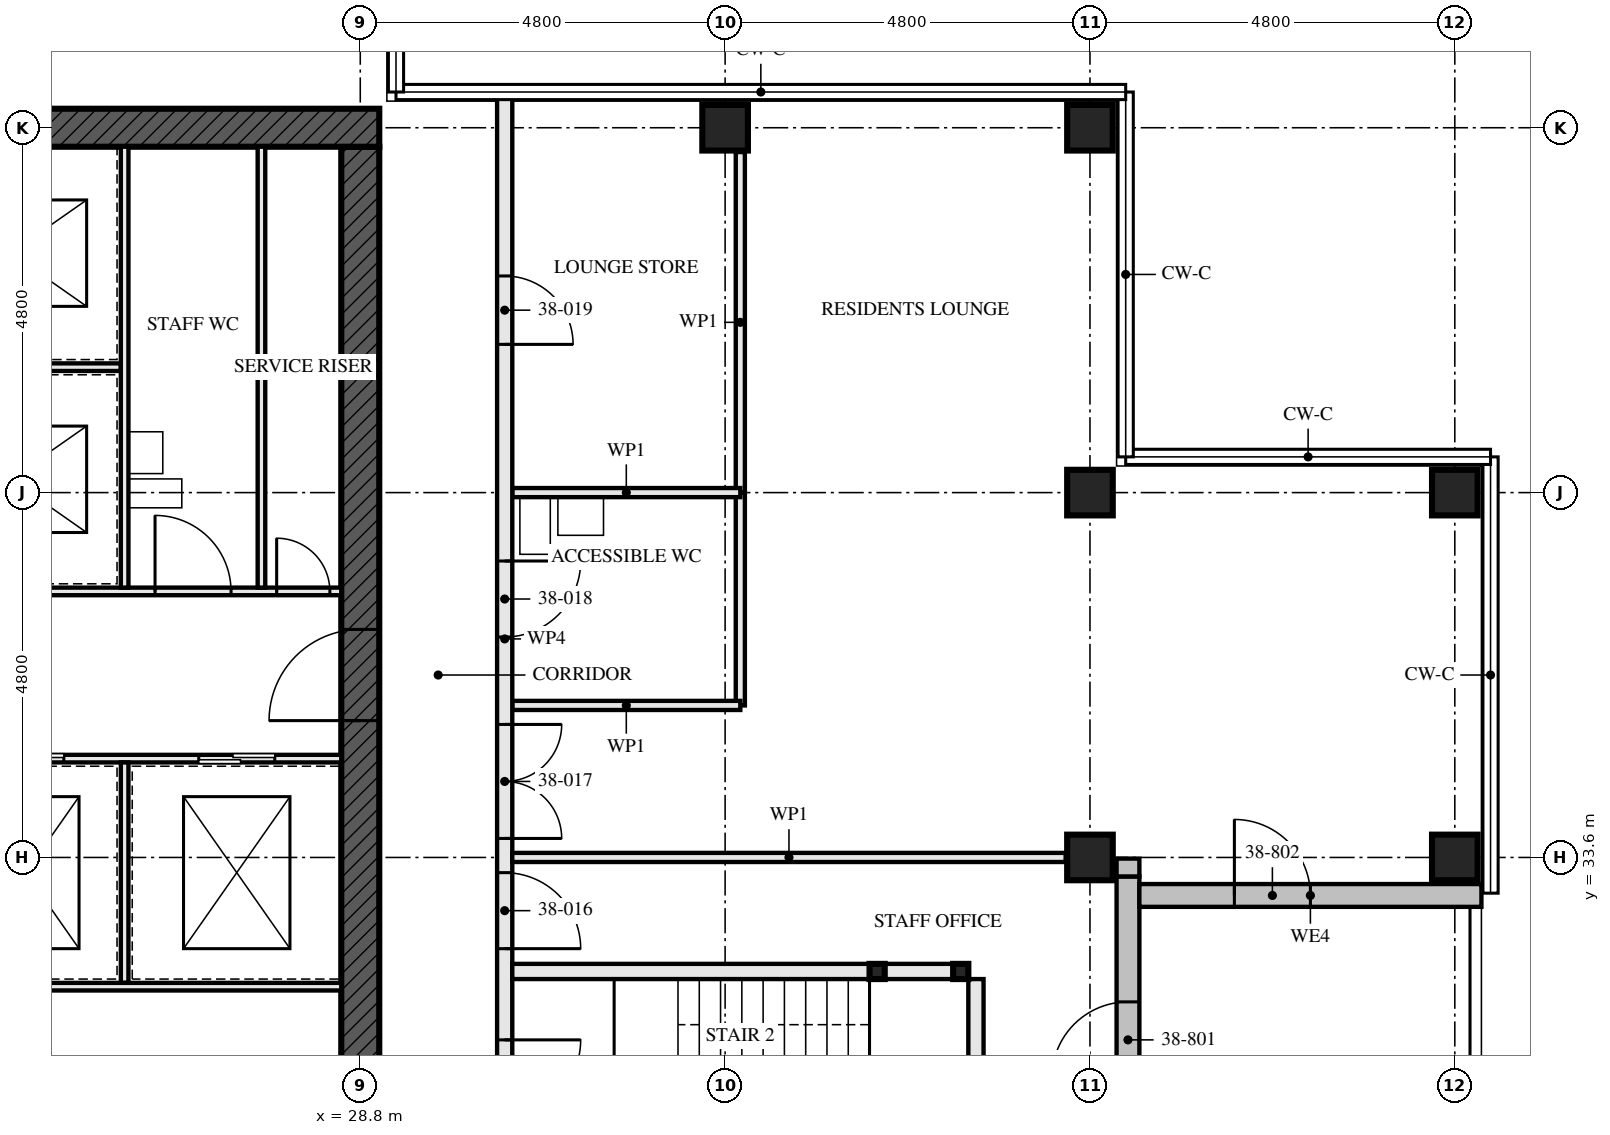
"""IFC4 building model, lengths in metres.
Left out: names, types, materials, properties, quantities, classifications, styles, units other than length and angle.
Written with IfcOpenShell. Run it as: python <this file> out.ifc"""

import sys

from ifc_helpers import new_model, si_unit, direction, frame, frame_2d, origin, origin_2d, place, context, subcontext, project, spatial, rectangle, hollow_rectangle, extrude, element, fill, save


model = new_model("IFC4")
c1 = context("Model", 3, precision=1e-05, world=origin(), true_north=direction((0.0, 1.0)))
c2 = subcontext(c1, "Body", "Model", "MODEL_VIEW")
j1 = project(units=[si_unit("LENGTHUNIT", "METRE"), si_unit("PLANEANGLEUNIT", "RADIAN")], contexts=[c1])
p1 = place(None, origin())
s1 = spatial("IfcSite", under=j1, at=p1, CompositionType="ELEMENT")
p2 = place(p1, origin())
s2 = spatial("IfcBuilding", under=s1, at=p2, CompositionType="ELEMENT")
p3 = place(p2, frame((0.0, 0.0, 141.0)))
s3 = spatial("IfcBuildingStorey", under=s2, at=p3, CompositionType="ELEMENT", Elevation=141.0)
for number, where, z_axis, x_axis in (
    (1, (33.6, 43.2, 0.0), (0.0, 0.0, 1.0), (0.0, 1.0, 0.0)),
    (2, (38.4, 33.6, 0.0), (0.0, 0.0, 1.0), (0.0, 1.0, 0.0)),
    (3, (38.4, 38.4, 0.0), (0.0, 0.0, 1.0), (0.0, 1.0, 0.0)),
    (4, (38.4, 43.2, 0.0), (0.0, 0.0, 1.0), (0.0, 1.0, 0.0)),
    (5, (43.2, 33.6, 0.0), (0.0, 0.0, 1.0), (0.0, 1.0, 0.0)),
    (6, (43.2, 38.4, 0.0), (0.0, 0.0, 1.0), (0.0, 1.0, 0.0)),
):
    element("IfcColumn", number, at=place(p3, frame(where, z_axis=z_axis, x_axis=x_axis)), inside=s3, PredefinedType="COLUMN", context=c2, shape_type="SweptSolid", body=[
        extrude(hollow_rectangle(XDim=0.6, YDim=0.6, WallThickness=0.08, at=origin_2d()), origin(), (0.0, 0.0, 1.0), 3.5),
    ])
p4 = place(p3, frame((29.05, 43.2, -0.17), z_axis=(0.0, 0.0, 1.0), x_axis=(-1.0, 0.0, 0.0)))
e7 = element("IfcWall", 7, at=p4, inside=s3, PredefinedType="SHEAR", context=c2, shape_type="SweptSolid", body=[
    extrude(rectangle(XDim=14.9, YDim=0.5, at=frame_2d((7.45, 0.0))), origin(), (0.0, 0.0, 1.0), 3.5),
])
p5 = place(p4, frame((6.85, 0.0, 0.17)))
e8 = element("IfcOpeningElement", 8, at=p5, cuts=e7, PredefinedType="OPENING", context=c2, shape_type="SweptSolid", body=[
    extrude(rectangle(XDim=1.2, YDim=2.1, at=frame_2d((0.6, 1.05))), frame((0.0, 0.26, 0.0), z_axis=(0.0, -1.0, 0.0), x_axis=(1.0, 0.0, 0.0)), (0.0, 0.0, 1.0), 0.521),
])
p6 = place(p3, frame((28.8, 29.05, -0.17), z_axis=(0.0, 0.0, 1.0), x_axis=(0.0, 1.0, 0.0)))
e9 = element("IfcWall", 9, at=p6, inside=s3, PredefinedType="SHEAR", context=c2, shape_type="SweptSolid", body=[
    extrude(rectangle(XDim=13.9, YDim=0.5, at=frame_2d((6.95, 0.0))), origin(), (0.0, 0.0, 1.0), 3.5),
])
p7 = place(p6, frame((6.35, 0.0, 0.17)))
e10 = element("IfcOpeningElement", 10, at=p7, cuts=e9, PredefinedType="OPENING", context=c2, shape_type="SweptSolid", body=[
    extrude(rectangle(XDim=1.2, YDim=2.1, at=frame_2d((0.6, 1.05))), frame((0.0, 0.26, 0.0), z_axis=(0.0, -1.0, 0.0), x_axis=(1.0, 0.0, 0.0)), (0.0, 0.0, 1.0), 0.521),
])
for number, where, z_axis, x_axis in (
    (11, (36.7, 32.1, 0.0), (0.0, 0.0, 1.0), (1.0, 0.0, 0.0)),
    (12, (35.6, 32.1, 0.0), (0.0, 0.0, 1.0), (1.0, 0.0, 0.0)),
):
    element("IfcColumn", number, at=place(p3, frame(where, z_axis=z_axis, x_axis=x_axis)), inside=s3, PredefinedType="COLUMN", context=c2, shape_type="SweptSolid", body=[
        extrude(hollow_rectangle(XDim=0.2, YDim=0.2, WallThickness=0.008, at=origin_2d()), origin(), (0.0, 0.0, 1.0), 3.33),
    ])
p8 = place(p3, frame((38.9, 28.45, 0.0), z_axis=(0.0, 0.0, 1.0), x_axis=(0.0, 1.0, 0.0)))
e13 = element("IfcWall", 13, at=p8, inside=s3, PredefinedType="SOLIDWALL", context=c2, shape_type="SweptSolid", body=[
    extrude(rectangle(XDim=4.9, YDim=0.3, at=frame_2d((2.45, 0.0))), origin(), (0.0, 0.0, 1.0), 3.5),
])
p9 = place(p8, frame((2.25, 0.0, 0.0)))
e14 = element("IfcOpeningElement", 14, at=p9, cuts=e13, PredefinedType="OPENING", context=c2, shape_type="SweptSolid", body=[
    extrude(rectangle(XDim=1.0, YDim=2.4, at=frame_2d((0.5, 1.2))), frame((0.0, 0.161, 0.0), z_axis=(0.0, -1.0, 0.0), x_axis=(1.0, 0.0, 0.0)), (0.0, 0.0, 1.0), 0.321),
])
p10 = place(p3, frame((39.05, 33.1, 0.0), z_axis=(0.0, 0.0, 1.0), x_axis=(1.0, 0.0, 0.0)))
e15 = element("IfcWall", 15, at=p10, inside=s3, PredefinedType="SOLIDWALL", context=c2, shape_type="SweptSolid", body=[
    extrude(rectangle(XDim=4.5, YDim=0.3, at=frame_2d((2.25, 0.0))), origin(), (0.0, 0.0, 1.0), 3.5),
])
p11 = place(p10, frame((1.25, 0.0, 0.0)))
e16 = element("IfcOpeningElement", 16, at=p11, cuts=e15, PredefinedType="OPENING", context=c2, shape_type="SweptSolid", body=[
    extrude(rectangle(XDim=1.0, YDim=2.4, at=frame_2d((0.5, 1.2))), frame((0.0, 0.161, 0.0), z_axis=(0.0, -1.0, 0.0), x_axis=(1.0, 0.0, 0.0)), (0.0, 0.0, 1.0), 0.321),
])
p12 = place(p3, frame((38.9, 33.35, 2.39), z_axis=(0.0, 0.0, 1.0), x_axis=(0.0, 1.0, 0.0)))
e17 = element("IfcWall", 17, at=p12, inside=s3, PredefinedType="SOLIDWALL", context=c2, shape_type="SweptSolid", body=[
    extrude(rectangle(XDim=0.235, YDim=0.3, at=frame_2d((0.117, 0.0))), origin(), (0.0, 0.0, 1.0), 0.88),
])
p13 = place(p3, frame((36.6, 32.1, 0.0), z_axis=(0.0, 0.0, 1.0), x_axis=(-1.0, 0.0, 0.0)))
e18 = element("IfcWall", 18, at=p13, inside=s3, PredefinedType="SOLIDWALL", context=c2, shape_type="SweptSolid", body=[
    extrude(rectangle(XDim=0.9, YDim=0.2, at=frame_2d((0.45, 0.0))), origin(), (0.0, 0.0, 1.0), 2.99),
])
p14 = place(p3, frame((35.5, 32.1, 0.0), z_axis=(0.0, 0.0, 1.0), x_axis=(-1.0, 0.0, 0.0)))
e19 = element("IfcWall", 19, at=p14, inside=s3, PredefinedType="SOLIDWALL", context=c2, shape_type="SweptSolid", body=[
    extrude(rectangle(XDim=4.7, YDim=0.2, at=frame_2d((2.35, 0.0))), origin(), (0.0, 0.0, 1.0), 2.99),
])
p15 = place(p3, frame((36.9, 29.4, 0.0), z_axis=(0.0, 0.0, 1.0), x_axis=(0.0, 1.0, 0.0)))
e20 = element("IfcWall", 20, at=p15, inside=s3, PredefinedType="SOLIDWALL", context=c2, shape_type="SweptSolid", body=[
    extrude(rectangle(XDim=2.6, YDim=0.2, at=frame_2d((1.3, 0.0))), origin(), (0.0, 0.0, 1.0), 3.33),
])
p16 = place(p3, frame((33.8, 35.6, 0.0), z_axis=(0.0, 0.0, 1.0), x_axis=(-1.0, 0.0, 0.0)))
e21 = element("IfcWall", 21, at=p16, inside=s3, PredefinedType="PARTITIONING", context=c2, shape_type="SweptSolid", body=[
    extrude(rectangle(XDim=3.0, YDim=0.12, at=frame_2d((1.5, 0.0))), origin(), (0.0, 0.0, 1.0), 3.33),
])
p17 = place(p3, frame((33.8, 35.6, 0.0), z_axis=(0.0, 0.0, 1.0), x_axis=(0.0, 1.0, 0.0)))
e22 = element("IfcWall", 22, at=p17, inside=s3, PredefinedType="PARTITIONING", context=c2, shape_type="SweptSolid", body=[
    extrude(rectangle(XDim=2.8, YDim=0.12, at=frame_2d((1.4, 0.0))), origin(), (0.0, 0.0, 1.0), 3.33),
])
p18 = place(p3, frame((33.8, 38.4, 0.0), z_axis=(0.0, 0.0, 1.0), x_axis=(-1.0, 0.0, 0.0)))
e23 = element("IfcWall", 23, at=p18, inside=s3, PredefinedType="PARTITIONING", context=c2, shape_type="SweptSolid", body=[
    extrude(rectangle(XDim=3.0, YDim=0.12, at=frame_2d((1.5, 0.0))), origin(), (0.0, 0.0, 1.0), 2.55),
])
p19 = place(p3, frame((33.8, 38.4, 0.0), z_axis=(0.0, 0.0, 1.0), x_axis=(0.0, 1.0, 0.0)))
e24 = element("IfcWall", 24, at=p19, inside=s3, PredefinedType="PARTITIONING", context=c2, shape_type="SweptSolid", body=[
    extrude(rectangle(XDim=4.48, YDim=0.12, at=frame_2d((2.24, 0.0))), origin(), (0.0, 0.0, 1.0), 3.33),
])
p20 = place(p3, frame((38.08, 33.6, 0.0), z_axis=(0.0, 0.0, 1.0), x_axis=(-1.0, 0.0, 0.0)))
e25 = element("IfcWall", 25, at=p20, inside=s3, PredefinedType="PARTITIONING", context=c2, shape_type="SweptSolid", body=[
    extrude(rectangle(XDim=7.28, YDim=0.12, at=frame_2d((3.64, 0.0))), origin(), (0.0, 0.0, 1.0), 2.55),
])
p21 = place(p3, frame((30.7, 29.3, 0.0), z_axis=(0.0, 0.0, 1.0), x_axis=(0.0, 1.0, 0.0)))
e26 = element("IfcWall", 26, at=p21, inside=s3, PredefinedType="PARTITIONING", context=c2, shape_type="SweptSolid", body=[
    extrude(rectangle(XDim=14.35, YDim=0.2, at=frame_2d((7.175, 0.0))), origin(), (0.0, 0.0, 1.0), 2.32),
])
p22 = place(p21, frame((0.9, 0.0, 0.0)))
e27 = element("IfcOpeningElement", 27, at=p22, cuts=e26, PredefinedType="OPENING", context=c2, shape_type="SweptSolid", body=[
    extrude(rectangle(XDim=1.0, YDim=2.1, at=frame_2d((0.5, 1.05))), frame((0.0, 0.111, 0.0), z_axis=(0.0, -1.0, 0.0), x_axis=(1.0, 0.0, 0.0)), (0.0, 0.0, 1.0), 0.221),
])
p23 = place(p21, frame((3.1, 0.0, 0.0)))
e28 = element("IfcOpeningElement", 28, at=p23, cuts=e26, PredefinedType="OPENING", context=c2, shape_type="SweptSolid", body=[
    extrude(rectangle(XDim=1.0, YDim=2.0, at=frame_2d((0.5, 1.0))), frame((0.0, 0.111, 0.0), z_axis=(0.0, -1.0, 0.0), x_axis=(1.0, 0.0, 0.0)), (0.0, 0.0, 1.0), 0.221),
])
p24 = place(p21, frame((4.55, 0.0, 0.0)))
e29 = element("IfcOpeningElement", 29, at=p24, cuts=e26, PredefinedType="OPENING", context=c2, shape_type="SweptSolid", body=[
    extrude(rectangle(XDim=1.5, YDim=2.1, at=frame_2d((0.75, 1.05))), frame((0.0, 0.111, 0.0), z_axis=(0.0, -1.0, 0.0), x_axis=(1.0, 0.0, 0.0)), (0.0, 0.0, 1.0), 0.221),
])
p25 = place(p21, frame((7.2, 0.0, 0.0)))
e30 = element("IfcOpeningElement", 30, at=p25, cuts=e26, PredefinedType="OPENING", context=c2, shape_type="SweptSolid", body=[
    extrude(rectangle(XDim=1.0, YDim=2.1, at=frame_2d((0.5, 1.05))), frame((0.0, 0.111, 0.0), z_axis=(0.0, -1.0, 0.0), x_axis=(1.0, 0.0, 0.0)), (0.0, 0.0, 1.0), 0.221),
])
p26 = place(p21, frame((11.05, 0.0, 0.0)))
e31 = element("IfcOpeningElement", 31, at=p26, cuts=e26, PredefinedType="OPENING", context=c2, shape_type="SweptSolid", body=[
    extrude(rectangle(XDim=0.9, YDim=2.1, at=frame_2d((0.45, 1.05))), frame((0.0, 0.111, 0.0), z_axis=(0.0, -1.0, 0.0), x_axis=(1.0, 0.0, 0.0)), (0.0, 0.0, 1.0), 0.221),
])
p27 = place(p3, frame((27.5, 37.15, 0.0), z_axis=(0.0, 0.0, 1.0), x_axis=(0.0, 1.0, 0.0)))
e32 = element("IfcWall", 32, at=p27, inside=s3, PredefinedType="SOLIDWALL", context=c2, shape_type="SweptSolid", body=[
    extrude(rectangle(XDim=5.8, YDim=0.1, at=frame_2d((2.9, 0.0))), origin(), (0.0, 0.0, 1.0), 3.33),
])
p28 = place(p3, frame((23.05, 34.9, 0.0), z_axis=(0.0, 0.0, 1.0), x_axis=(1.0, 0.0, 0.0)))
e33 = element("IfcWall", 33, at=p28, inside=s3, PredefinedType="SOLIDWALL", context=c2, shape_type="SweptSolid", body=[
    extrude(rectangle(XDim=5.5, YDim=0.1, at=frame_2d((2.75, 0.0))), origin(), (0.0, 0.0, 1.0), 3.33),
])
p29 = place(p28, frame((0.85, 0.0, 0.0)))
e34 = element("IfcOpeningElement", 34, at=p29, cuts=e33, PredefinedType="OPENING", context=c2, shape_type="SweptSolid", body=[
    extrude(rectangle(XDim=1.0, YDim=2.1, at=frame_2d((0.5, 1.05))), frame((0.0, 0.061, 0.0), z_axis=(0.0, -1.0, 0.0), x_axis=(1.0, 0.0, 0.0)), (0.0, 0.0, 1.0), 0.121),
])
p30 = place(p28, frame((3.625, 0.0, 0.0)))
e35 = element("IfcOpeningElement", 35, at=p30, cuts=e33, PredefinedType="OPENING", context=c2, shape_type="SweptSolid", body=[
    extrude(rectangle(XDim=1.0, YDim=2.1, at=frame_2d((0.5, 1.05))), frame((0.0, 0.061, 0.0), z_axis=(0.0, -1.0, 0.0), x_axis=(1.0, 0.0, 0.0)), (0.0, 0.0, 1.0), 0.121),
])
p31 = place(p3, frame((22.65, 37.1, 0.0), z_axis=(0.0, 0.0, 1.0), x_axis=(1.0, 0.0, 0.0)))
e36 = element("IfcWall", 36, at=p31, inside=s3, PredefinedType="SOLIDWALL", context=c2, shape_type="SweptSolid", body=[
    extrude(rectangle(XDim=5.9, YDim=0.1, at=frame_2d((2.95, 0.0))), origin(), (0.0, 0.0, 1.0), 3.33),
])
p32 = place(p31, frame((3.45, 0.0, 0.0)))
e37 = element("IfcOpeningElement", 37, at=p32, cuts=e36, PredefinedType="OPENING", context=c2, shape_type="SweptSolid", body=[
    extrude(rectangle(XDim=1.0, YDim=2.1, at=frame_2d((0.5, 1.05))), frame((0.0, 0.061, 0.0), z_axis=(0.0, -1.0, 0.0), x_axis=(1.0, 0.0, 0.0)), (0.0, 0.0, 1.0), 0.121),
])
p33 = place(p31, frame((5.05, 0.0, 0.0)))
e38 = element("IfcOpeningElement", 38, at=p33, cuts=e36, PredefinedType="OPENING", context=c2, shape_type="SweptSolid", body=[
    extrude(rectangle(XDim=0.7, YDim=2.1, at=frame_2d((0.35, 1.05))), frame((0.0, 0.061, 0.0), z_axis=(0.0, -1.0, 0.0), x_axis=(1.0, 0.0, 0.0)), (0.0, 0.0, 1.0), 0.121),
])
p34 = place(p3, frame((22.75, 40.05, 0.0), z_axis=(0.0, 0.0, 1.0), x_axis=(1.0, 0.0, 0.0)))
e39 = element("IfcWall", 39, at=p34, inside=s3, PredefinedType="SOLIDWALL", context=c2, shape_type="SweptSolid", body=[
    extrude(rectangle(XDim=2.9, YDim=0.1, at=frame_2d((1.45, 0.0))), origin(), (0.0, 0.0, 1.0), 3.33),
])
p35 = place(p3, frame((25.7, 37.15, 0.0), z_axis=(0.0, 0.0, 1.0), x_axis=(0.0, 1.0, 0.0)))
e40 = element("IfcWall", 40, at=p35, inside=s3, PredefinedType="SOLIDWALL", context=c2, shape_type="SweptSolid", body=[
    extrude(rectangle(XDim=5.8, YDim=0.1, at=frame_2d((2.9, 0.0))), origin(), (0.0, 0.0, 1.0), 3.33),
])
p36 = place(p3, frame((25.7, 31.95, 0.0), z_axis=(0.0, 0.0, 1.0), x_axis=(0.0, 1.0, 0.0)))
e41 = element("IfcWall", 41, at=p36, inside=s3, PredefinedType="SOLIDWALL", context=c2, shape_type="SweptSolid", body=[
    extrude(rectangle(XDim=2.9, YDim=0.1, at=frame_2d((1.45, 0.0))), origin(), (0.0, 0.0, 1.0), 3.33),
])
p37 = place(p3, frame((23.15, 31.9, 0.0), z_axis=(0.0, 0.0, 1.0), x_axis=(1.0, 0.0, 0.0)))
e42 = element("IfcWall", 42, at=p37, inside=s3, PredefinedType="SOLIDWALL", context=c2, shape_type="SweptSolid", body=[
    extrude(rectangle(XDim=5.4, YDim=0.1, at=frame_2d((2.7, 0.0))), origin(), (0.0, 0.0, 1.0), 3.33),
])
p38 = place(p9, origin())
e43 = element("IfcDoor", 43, at=p38, inside=s3, OperationType="SINGLE_SWING_LEFT", PredefinedType="DOOR", context=c2, shape_type="SweptSolid", body=[
    extrude(rectangle(XDim=1.0, YDim=2.4, at=frame_2d((0.5, 1.2))), frame((0.0, 0.035, 0.0), z_axis=(0.0, -1.0, 0.0), x_axis=(1.0, 0.0, 0.0)), (0.0, 0.0, 1.0), 0.07),
])
fill(e14, e43)
p39 = place(p11, origin())
e44 = element("IfcDoor", 44, at=p39, inside=s3, OperationType="SINGLE_SWING_LEFT", PredefinedType="DOOR", context=c2, shape_type="SweptSolid", body=[
    extrude(rectangle(XDim=1.0, YDim=2.4, at=frame_2d((0.5, 1.2))), frame((0.0, 0.035, 0.0), z_axis=(0.0, -1.0, 0.0), x_axis=(1.0, 0.0, 0.0)), (0.0, 0.0, 1.0), 0.07),
])
fill(e16, e44)
p40 = place(p22, frame((1.0, 0.0, 0.0), z_axis=(0.0, 0.0, 1.0), x_axis=(-1.0, 0.0, 0.0)))
e45 = element("IfcDoor", 45, at=p40, inside=s3, OperationType="SINGLE_SWING_RIGHT", PredefinedType="DOOR", context=c2, shape_type="SweptSolid", body=[
    extrude(rectangle(XDim=1.0, YDim=2.1, at=frame_2d((0.5, 1.05))), frame((0.0, 0.032, 0.0), z_axis=(0.0, -1.0, 0.0), x_axis=(1.0, 0.0, 0.0)), (0.0, 0.0, 1.0), 0.064),
])
fill(e27, e45)
p41 = place(p23, frame((1.0, 0.0, 0.0), z_axis=(0.0, 0.0, 1.0), x_axis=(-1.0, 0.0, 0.0)))
e46 = element("IfcDoor", 46, at=p41, inside=s3, OperationType="SINGLE_SWING_LEFT", PredefinedType="DOOR", context=c2, shape_type="SweptSolid", body=[
    extrude(rectangle(XDim=1.0, YDim=2.0, at=frame_2d((0.5, 1.0))), frame((0.0, 0.027, 0.0), z_axis=(0.0, -1.0, 0.0), x_axis=(1.0, 0.0, 0.0)), (0.0, 0.0, 1.0), 0.054),
])
fill(e28, e46)
p42 = place(p24, frame((1.5, 0.0, 0.0), z_axis=(0.0, 0.0, 1.0), x_axis=(-1.0, 0.0, 0.0)))
e47 = element("IfcDoor", 47, at=p42, inside=s3, OperationType="DOUBLE_DOOR_SINGLE_SWING", PredefinedType="DOOR", context=c2, shape_type="SweptSolid", body=[
    extrude(rectangle(XDim=1.5, YDim=2.1, at=frame_2d((0.75, 1.05))), frame((0.0, 0.027, 0.0), z_axis=(0.0, -1.0, 0.0), x_axis=(1.0, 0.0, 0.0)), (0.0, 0.0, 1.0), 0.054),
])
fill(e29, e47)
p43 = place(p25, frame((1.0, 0.0, 0.0), z_axis=(0.0, 0.0, 1.0), x_axis=(-1.0, 0.0, 0.0)))
e48 = element("IfcDoor", 48, at=p43, inside=s3, OperationType="SINGLE_SWING_RIGHT", PredefinedType="DOOR", context=c2, shape_type="SweptSolid", body=[
    extrude(rectangle(XDim=1.0, YDim=2.1, at=frame_2d((0.5, 1.05))), frame((0.0, 0.027, 0.0), z_axis=(0.0, -1.0, 0.0), x_axis=(1.0, 0.0, 0.0)), (0.0, 0.0, 1.0), 0.054),
])
fill(e30, e48)
p44 = place(p26, frame((0.9, 0.0, 0.0), z_axis=(0.0, 0.0, 1.0), x_axis=(-1.0, 0.0, 0.0)))
e49 = element("IfcDoor", 49, at=p44, inside=s3, OperationType="SINGLE_SWING_LEFT", PredefinedType="DOOR", context=c2, shape_type="SweptSolid", body=[
    extrude(rectangle(XDim=0.9, YDim=2.1, at=frame_2d((0.45, 1.05))), frame((0.0, 0.027, 0.0), z_axis=(0.0, -1.0, 0.0), x_axis=(1.0, 0.0, 0.0)), (0.0, 0.0, 1.0), 0.054),
])
fill(e31, e49)
p45 = place(p29, origin())
e50 = element("IfcDoor", 50, at=p45, inside=s3, OperationType="SLIDING_TO_LEFT", PredefinedType="DOOR", context=c2, shape_type="SweptSolid", body=[
    extrude(rectangle(XDim=1.0, YDim=2.1, at=frame_2d((0.5, 1.05))), frame((0.0, 0.05, 0.0), z_axis=(0.0, -1.0, 0.0), x_axis=(1.0, 0.0, 0.0)), (0.0, 0.0, 1.0), 0.1),
])
fill(e34, e50)
p46 = place(p30, origin())
e51 = element("IfcDoor", 51, at=p46, inside=s3, OperationType="SLIDING_TO_LEFT", PredefinedType="DOOR", context=c2, shape_type="SweptSolid", body=[
    extrude(rectangle(XDim=1.0, YDim=2.1, at=frame_2d((0.5, 1.05))), frame((0.0, 0.05, 0.0), z_axis=(0.0, -1.0, 0.0), x_axis=(1.0, 0.0, 0.0)), (0.0, 0.0, 1.0), 0.1),
])
fill(e35, e51)
p47 = place(p32, origin())
e52 = element("IfcDoor", 52, at=p47, inside=s3, OperationType="SINGLE_SWING_RIGHT", PredefinedType="DOOR", context=c2, shape_type="SweptSolid", body=[
    extrude(rectangle(XDim=1.0, YDim=2.1, at=frame_2d((0.5, 1.05))), frame((0.0, 0.027, 0.0), z_axis=(0.0, -1.0, 0.0), x_axis=(1.0, 0.0, 0.0)), (0.0, 0.0, 1.0), 0.054),
])
fill(e37, e52)
p48 = place(p33, origin())
e53 = element("IfcDoor", 53, at=p48, inside=s3, OperationType="SINGLE_SWING_RIGHT", PredefinedType="DOOR", context=c2, shape_type="SweptSolid", body=[
    extrude(rectangle(XDim=0.7, YDim=2.1, at=frame_2d((0.35, 1.05))), frame((0.0, 0.027, 0.0), z_axis=(0.0, -1.0, 0.0), x_axis=(1.0, 0.0, 0.0)), (0.0, 0.0, 1.0), 0.054),
])
fill(e38, e53)
p49 = place(p7, origin())
e54 = element("IfcDoor", 54, at=p49, inside=s3, OperationType="SINGLE_SWING_LEFT", PredefinedType="DOOR", context=c2, shape_type="SweptSolid", body=[
    extrude(rectangle(XDim=1.2, YDim=2.1, at=frame_2d((0.6, 1.05))), frame((0.0, 0.027, 0.0), z_axis=(0.0, -1.0, 0.0), x_axis=(1.0, 0.0, 0.0)), (0.0, 0.0, 1.0), 0.054),
])
fill(e10, e54)
save(model, sys.argv[1])
